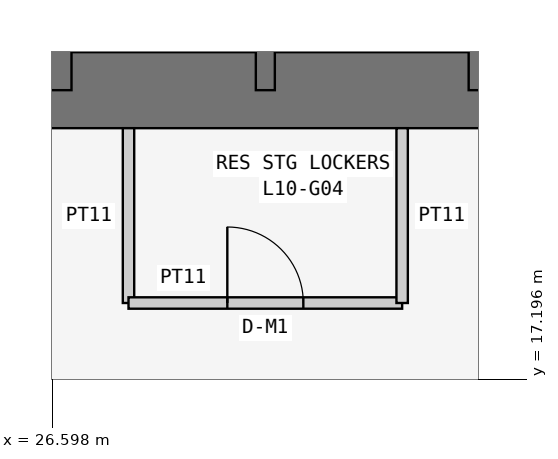
"""IFC4 building model, lengths in metres.
Left out: names, types, materials, properties, quantities, classifications, styles, units other than length and angle.
Written with IfcOpenShell. Run it as: python <this file> out.ifc"""

import sys

from ifc_helpers import new_model, si_unit, direction, frame, frame_2d, origin, place, context, subcontext, project, spatial, rectangle, extrude, element, fill, save


model = new_model("IFC4")
c1 = context("Model", 3, precision=1e-05, world=origin(), true_north=direction((0.0, 1.0)))
c2 = subcontext(c1, "Body", "Model", "MODEL_VIEW")
j1 = project(units=[si_unit("LENGTHUNIT", "METRE"), si_unit("PLANEANGLEUNIT", "RADIAN")], contexts=[c1])
p1 = place(None, origin())
s1 = spatial("IfcSite", under=j1, at=p1, CompositionType="ELEMENT")
p2 = place(p1, origin())
s2 = spatial("IfcBuilding", under=s1, at=p2, CompositionType="ELEMENT")
p3 = place(p2, frame((0.0, 0.0, 45.3)))
s3 = spatial("IfcBuildingStorey", under=s2, at=p3, CompositionType="ELEMENT", Elevation=45.3)
p4 = place(p3, frame((21.0, 21.0, 0.0), z_axis=(0.0, 0.0, 1.0), x_axis=(1.0, 0.0, 0.0)))
e1 = element("IfcWall", 1, at=p4, inside=s3, PredefinedType="SHEAR", context=c2, shape_type="SweptSolid", body=[
    extrude(rectangle(XDim=17.3, YDim=1.0, at=frame_2d((8.65, 0.0))), origin(), (0.0, 0.0, 1.0), 3.6),
])
p5 = place(p3, frame((26.6, 21.0, 0.0), z_axis=(0.0, 0.0, 1.0), x_axis=(0.0, 1.0, 0.0)))
e2 = element("IfcWall", 2, at=p5, inside=s3, PredefinedType="SHEAR", context=c2, shape_type="SweptSolid", body=[
    extrude(rectangle(XDim=16.8, YDim=0.5, at=frame_2d((8.4, 0.0))), origin(), (0.0, 0.0, 1.0), 3.6),
])
p6 = place(p5, frame((10.4, 0.0, 0.0)))
e3 = element("IfcOpeningElement", 3, at=p6, cuts=e2, PredefinedType="OPENING", context=c2, shape_type="SweptSolid", body=[
    extrude(rectangle(XDim=1.2, YDim=2.1, at=frame_2d((0.6, 1.05))), frame((0.0, 0.26, 0.0), z_axis=(0.0, -1.0, 0.0), x_axis=(1.0, 0.0, 0.0)), (0.0, 0.0, 1.0), 0.52),
])
for number, where, z_axis, x_axis in (
    (4, (29.4, 21.0, 0.0), (0.0, 0.0, 1.0), (0.0, 1.0, 0.0)),
    (5, (32.2, 21.0, 0.0), (0.0, 0.0, 1.0), (0.0, 1.0, 0.0)),
):
    element("IfcWall", number, at=place(p3, frame(where, z_axis=z_axis, x_axis=x_axis)), inside=s3, PredefinedType="SHEAR", context=c2, shape_type="SweptSolid", body=[
        extrude(rectangle(XDim=3.2, YDim=0.25, at=frame_2d((1.6, 0.0))), origin(), (0.0, 0.0, 1.0), 3.6),
    ])
p7 = place(p3, frame((27.6, 20.5, 0.0), z_axis=(0.0, 0.0, 1.0), x_axis=(0.0, -1.0, 0.0)))
e6 = element("IfcWall", 6, at=p7, inside=s3, PredefinedType="PARTITIONING", context=c2, shape_type="SweptSolid", body=[
    extrude(rectangle(XDim=2.3, YDim=0.15, at=frame_2d((1.15, 0.0))), origin(), (0.0, 0.0, 1.0), 3.45),
])
p8 = place(p3, frame((27.6, 18.2, 0.0), z_axis=(0.0, 0.0, 1.0), x_axis=(1.0, 0.0, 0.0)))
e7 = element("IfcWall", 7, at=p8, inside=s3, PredefinedType="PARTITIONING", context=c2, shape_type="SweptSolid", body=[
    extrude(rectangle(XDim=3.6, YDim=0.15, at=frame_2d((1.8, 0.0))), origin(), (0.0, 0.0, 1.0), 3.45),
])
p9 = place(p8, frame((1.3, 0.0, 0.0)))
e8 = element("IfcOpeningElement", 8, at=p9, cuts=e7, PredefinedType="OPENING", context=c2, shape_type="SweptSolid", body=[
    extrude(rectangle(XDim=1.0, YDim=2.1, at=frame_2d((0.5, 1.05))), frame((0.0, 0.085, 0.0), z_axis=(0.0, -1.0, 0.0), x_axis=(1.0, 0.0, 0.0)), (0.0, 0.0, 1.0), 0.17),
])
p10 = place(p3, frame((31.2, 18.2, 0.0), z_axis=(0.0, 0.0, 1.0), x_axis=(0.0, 1.0, 0.0)))
e9 = element("IfcWall", 9, at=p10, inside=s3, PredefinedType="PARTITIONING", context=c2, shape_type="SweptSolid", body=[
    extrude(rectangle(XDim=2.3, YDim=0.15, at=frame_2d((1.15, 0.0))), origin(), (0.0, 0.0, 1.0), 3.45),
])
p11 = place(p9, origin())
e10 = element("IfcDoor", 10, at=p11, inside=s3, OperationType="SINGLE_SWING_LEFT", PredefinedType="DOOR", context=c2, shape_type="SweptSolid", body=[
    extrude(rectangle(XDim=1.0, YDim=2.1, at=frame_2d((0.5, 1.05))), frame((0.0, 0.025, 0.0), z_axis=(0.0, -1.0, 0.0), x_axis=(1.0, 0.0, 0.0)), (0.0, 0.0, 1.0), 0.05),
])
fill(e8, e10)
save(model, sys.argv[1])
